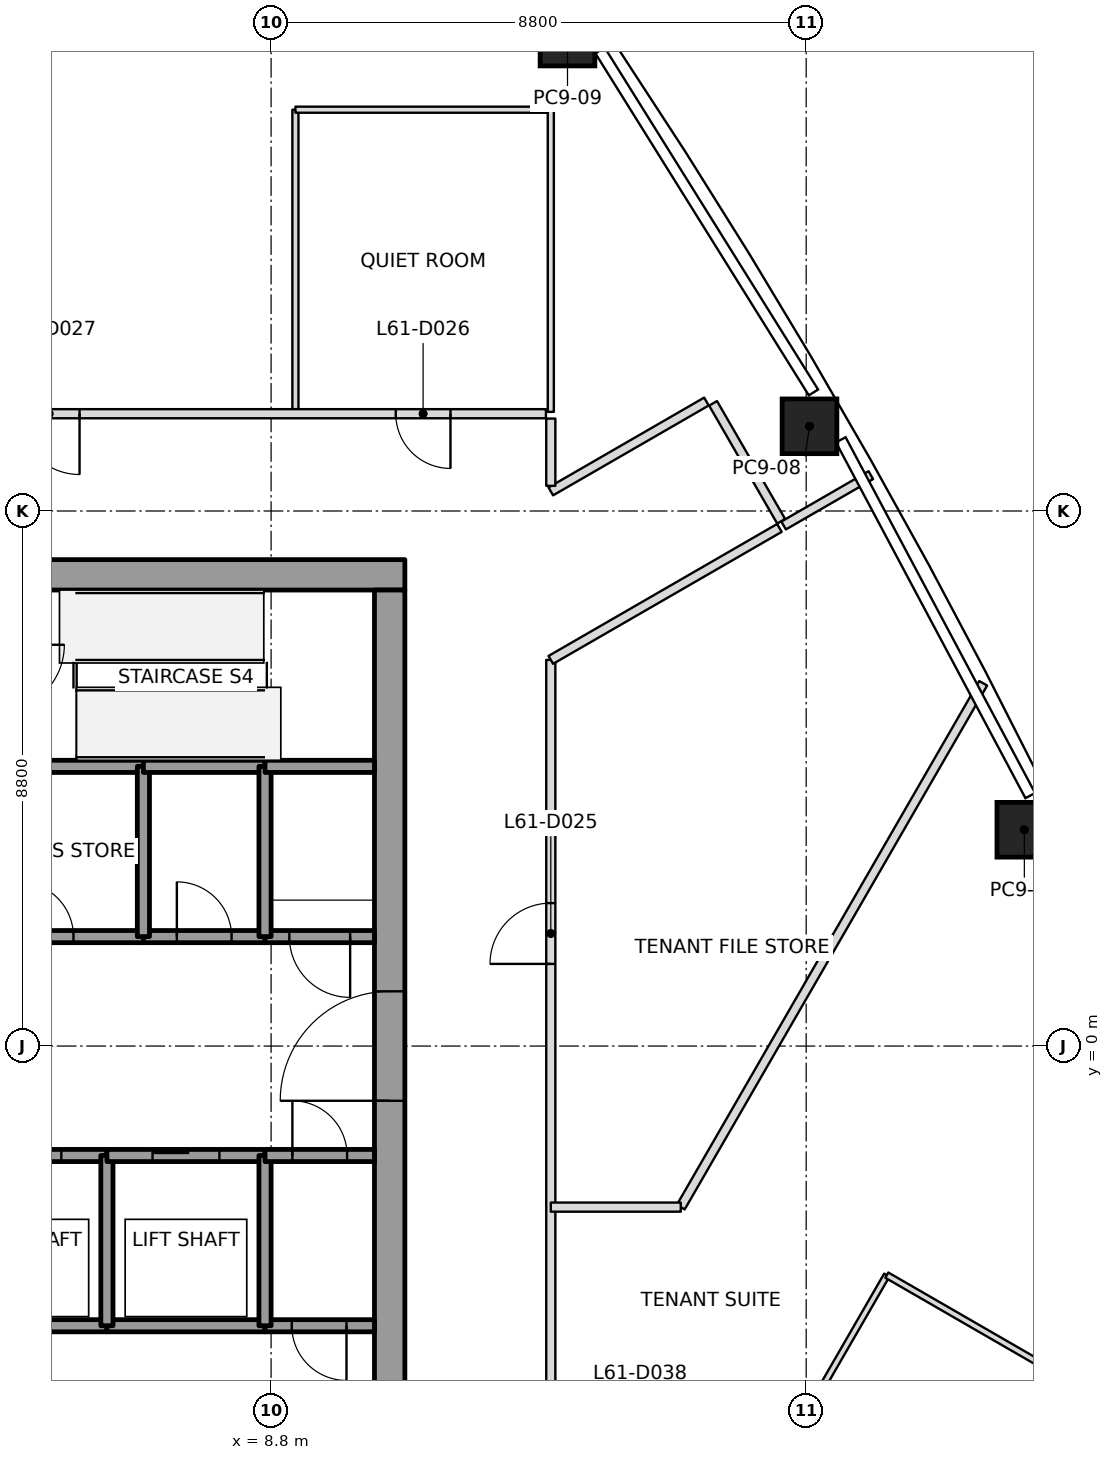
"""IFC4 building model, lengths in metres.
Left out: names, types, materials, properties, quantities, classifications, styles, units other than length and angle.
Written with IfcOpenShell. Run it as: python <this file> out.ifc"""

import sys

from ifc_helpers import new_model, si_unit, direction, frame, frame_2d, origin, origin_2d, place, context, subcontext, project, spatial, rectangle, extrude, element, fill, save


model = new_model("IFC4")
c1 = context("Model", 3, precision=1e-05, world=origin(), true_north=direction((0.0, 1.0)))
c2 = subcontext(c1, "Body", "Model", "MODEL_VIEW")
j1 = project(units=[si_unit("LENGTHUNIT", "METRE"), si_unit("PLANEANGLEUNIT", "RADIAN")], contexts=[c1])
p1 = place(None, origin())
s1 = spatial("IfcSite", under=j1, at=p1, CompositionType="ELEMENT")
p2 = place(p1, origin())
s2 = spatial("IfcBuilding", under=s1, at=p2, CompositionType="ELEMENT")
p3 = place(p2, frame((0.0, 0.0, 271.0)))
s3 = spatial("IfcBuildingStorey", under=s2, at=p3, CompositionType="ELEMENT", Elevation=271.0)
p4 = place(p3, frame((21.188, 3.557, 0.0), z_axis=(-0.014036676147, 0.001952928855, 0.999899573853), x_axis=(-0.439409931321, 0.898251713248, -0.007922872255)))
e1 = element("IfcColumn", 1, at=p4, inside=s3, PredefinedType="COLUMN", context=c2, shape_type="SweptSolid", body=[
    extrude(rectangle(XDim=0.9, YDim=0.9, at=origin_2d()), origin(), (0.0, 0.0, 1.0), 4.0),
])
p5 = place(p3, frame((17.655, 10.193, 0.0), z_axis=(-0.009887049298, -0.00573692984, 0.999934664812), x_axis=(-0.499975560967, 0.866039512843, 2.5126546e-05)))
e2 = element("IfcColumn", 2, at=p5, inside=s3, PredefinedType="COLUMN", context=c2, shape_type="SweptSolid", body=[
    extrude(rectangle(XDim=0.9, YDim=0.9, at=origin_2d()), origin(), (0.0, 0.0, 1.0), 4.0),
])
p6 = place(p3, frame((13.675, 16.571, 0.0), z_axis=(-0.005309522349, -0.013182262383, 0.999899013366), x_axis=(-0.558186239097, 0.829677368481, 0.007974127734)))
e3 = element("IfcColumn", 3, at=p6, inside=s3, PredefinedType="COLUMN", context=c2, shape_type="SweptSolid", body=[
    extrude(rectangle(XDim=0.9, YDim=0.9, at=origin_2d()), origin(), (0.0, 0.0, 1.0), 4.0),
])
p7 = place(p3, frame((-11.0, 7.75, 0.0), z_axis=(0.0, 0.0, 1.0), x_axis=(1.0, 0.0, 0.0)))
e4 = element("IfcWall", 4, at=p7, inside=s3, PredefinedType="SHEAR", context=c2, shape_type="SweptSolid", body=[
    extrude(rectangle(XDim=22.0, YDim=0.5, at=frame_2d((11.0, 0.0))), origin(), (0.0, 0.0, 1.0), 4.0),
])
p8 = place(p7, frame((10.45, 0.0, 0.0)))
e5 = element("IfcOpeningElement", 5, at=p8, cuts=e4, PredefinedType="OPENING", context=c2, shape_type="SweptSolid", body=[
    extrude(rectangle(XDim=1.1, YDim=2.1, at=frame_2d((0.55, 1.05))), frame((0.0, 0.25, 0.0), z_axis=(0.0, -1.0, 0.0), x_axis=(1.0, 0.0, 0.0)), (0.0, 0.0, 1.0), 0.5),
])
p9 = place(p3, frame((10.75, -7.5, 0.0), z_axis=(0.0, 0.0, 1.0), x_axis=(0.0, 1.0, 0.0)))
e6 = element("IfcWall", 6, at=p9, inside=s3, PredefinedType="SHEAR", context=c2, shape_type="SweptSolid", body=[
    extrude(rectangle(XDim=15.0, YDim=0.5, at=frame_2d((7.5, 0.0))), origin(), (0.0, 0.0, 1.0), 4.0),
])
p10 = place(p9, frame((6.6, 0.0, 0.0)))
e7 = element("IfcOpeningElement", 7, at=p10, cuts=e6, PredefinedType="OPENING", context=c2, shape_type="SweptSolid", body=[
    extrude(rectangle(XDim=1.8, YDim=2.1, at=frame_2d((0.9, 1.05))), frame((0.0, 0.25, 0.0), z_axis=(0.0, -1.0, 0.0), x_axis=(1.0, 0.0, 0.0)), (0.0, 0.0, 1.0), 0.5),
])
p11 = place(p3, frame((3.5, -1.8, 0.0), z_axis=(0.0, 0.0, 1.0), x_axis=(1.0, 0.0, 0.0)))
e8 = element("IfcWall", 8, at=p11, inside=s3, PredefinedType="SOLIDWALL", context=c2, shape_type="SweptSolid", body=[
    extrude(rectangle(XDim=2.6, YDim=0.2, at=frame_2d((1.3, 0.0))), origin(), (0.0, 0.0, 1.0), 3.85),
])
p12 = place(p11, frame((0.75, 0.0, 0.0)))
e9 = element("IfcOpeningElement", 9, at=p12, cuts=e8, PredefinedType="OPENING", context=c2, shape_type="SweptSolid", body=[
    extrude(rectangle(XDim=1.1, YDim=2.1, at=frame_2d((0.55, 1.05))), frame((0.0, 0.1, 0.0), z_axis=(0.0, -1.0, 0.0), x_axis=(1.0, 0.0, 0.0)), (0.0, 0.0, 1.0), 0.2),
])
p13 = place(p3, frame((3.5, 1.8, 0.0), z_axis=(0.0, 0.0, 1.0), x_axis=(1.0, 0.0, 0.0)))
e10 = element("IfcWall", 10, at=p13, inside=s3, PredefinedType="SOLIDWALL", context=c2, shape_type="SweptSolid", body=[
    extrude(rectangle(XDim=3.2, YDim=0.2, at=frame_2d((1.6, 0.0))), origin(), (0.0, 0.0, 1.0), 3.85),
])
p14 = place(p13, frame((1.15, 0.0, 0.0)))
e11 = element("IfcOpeningElement", 11, at=p14, cuts=e10, PredefinedType="OPENING", context=c2, shape_type="SweptSolid", body=[
    extrude(rectangle(XDim=0.9, YDim=2.1, at=frame_2d((0.45, 1.05))), frame((0.0, 0.1, 0.0), z_axis=(0.0, -1.0, 0.0), x_axis=(1.0, 0.0, 0.0)), (0.0, 0.0, 1.0), 0.2),
])
p15 = place(p3, frame((6.7, 4.6, 0.0), z_axis=(0.0, 0.0, 1.0), x_axis=(-1.0, 0.0, 0.0)))
e12 = element("IfcWall", 12, at=p15, inside=s3, PredefinedType="SOLIDWALL", context=c2, shape_type="SweptSolid", body=[
    extrude(rectangle(XDim=2.4, YDim=0.2, at=frame_2d((1.2, 0.0))), origin(), (0.0, 0.0, 1.0), 3.85),
])
p16 = place(p3, frame((6.1, -4.6, 0.0), z_axis=(0.0, 0.0, 1.0), x_axis=(-1.0, 0.0, 0.0)))
e13 = element("IfcWall", 13, at=p16, inside=s3, PredefinedType="SOLIDWALL", context=c2, shape_type="SweptSolid", body=[
    extrude(rectangle(XDim=1.6, YDim=0.2, at=frame_2d((0.8, 0.0))), origin(), (0.0, 0.0, 1.0), 3.85),
])
p17 = place(p3, frame((8.7, -4.6, 0.0), z_axis=(0.0, 0.0, 1.0), x_axis=(-1.0, 0.0, 0.0)))
e14 = element("IfcWall", 14, at=p17, inside=s3, PredefinedType="SOLIDWALL", context=c2, shape_type="SweptSolid", body=[
    extrude(rectangle(XDim=2.6, YDim=0.2, at=frame_2d((1.3, 0.0))), origin(), (0.0, 0.0, 1.0), 3.85),
])
p18 = place(p3, frame((6.1, -4.6, 0.0), z_axis=(0.0, 0.0, 1.0), x_axis=(0.0, 1.0, 0.0)))
e15 = element("IfcWall", 15, at=p18, inside=s3, PredefinedType="SOLIDWALL", context=c2, shape_type="SweptSolid", body=[
    extrude(rectangle(XDim=2.8, YDim=0.2, at=frame_2d((1.4, 0.0))), origin(), (0.0, 0.0, 1.0), 3.85),
])
p19 = place(p3, frame((6.1, -1.8, 0.0), z_axis=(0.0, 0.0, 1.0), x_axis=(1.0, 0.0, 0.0)))
e16 = element("IfcWall", 16, at=p19, inside=s3, PredefinedType="SOLIDWALL", context=c2, shape_type="SweptSolid", body=[
    extrude(rectangle(XDim=2.6, YDim=0.2, at=frame_2d((1.3, 0.0))), origin(), (0.0, 0.0, 1.0), 3.85),
])
p20 = place(p19, frame((0.75, 0.0, 0.0)))
e17 = element("IfcOpeningElement", 17, at=p20, cuts=e16, PredefinedType="OPENING", context=c2, shape_type="SweptSolid", body=[
    extrude(rectangle(XDim=1.1, YDim=2.1, at=frame_2d((0.55, 1.05))), frame((0.0, 0.1, 0.0), z_axis=(0.0, -1.0, 0.0), x_axis=(1.0, 0.0, 0.0)), (0.0, 0.0, 1.0), 0.2),
])
p21 = place(p3, frame((6.7, 1.8, 0.0), z_axis=(0.0, 0.0, 1.0), x_axis=(1.0, 0.0, 0.0)))
e18 = element("IfcWall", 18, at=p21, inside=s3, PredefinedType="SOLIDWALL", context=c2, shape_type="SweptSolid", body=[
    extrude(rectangle(XDim=2.0, YDim=0.2, at=frame_2d((1.0, 0.0))), origin(), (0.0, 0.0, 1.0), 3.85),
])
p22 = place(p21, frame((0.55, 0.0, 0.0)))
e19 = element("IfcOpeningElement", 19, at=p22, cuts=e18, PredefinedType="OPENING", context=c2, shape_type="SweptSolid", body=[
    extrude(rectangle(XDim=0.9, YDim=2.1, at=frame_2d((0.45, 1.05))), frame((0.0, 0.1, 0.0), z_axis=(0.0, -1.0, 0.0), x_axis=(1.0, 0.0, 0.0)), (0.0, 0.0, 1.0), 0.2),
])
p23 = place(p3, frame((6.7, 1.8, 0.0), z_axis=(0.0, 0.0, 1.0), x_axis=(0.0, 1.0, 0.0)))
e20 = element("IfcWall", 20, at=p23, inside=s3, PredefinedType="SOLIDWALL", context=c2, shape_type="SweptSolid", body=[
    extrude(rectangle(XDim=2.8, YDim=0.2, at=frame_2d((1.4, 0.0))), origin(), (0.0, 0.0, 1.0), 3.85),
])
p24 = place(p3, frame((8.7, 4.6, 0.0), z_axis=(0.0, 0.0, 1.0), x_axis=(-1.0, 0.0, 0.0)))
e21 = element("IfcWall", 21, at=p24, inside=s3, PredefinedType="SOLIDWALL", context=c2, shape_type="SweptSolid", body=[
    extrude(rectangle(XDim=2.0, YDim=0.2, at=frame_2d((1.0, 0.0))), origin(), (0.0, 0.0, 1.0), 3.85),
])
p25 = place(p3, frame((10.5, -4.6, 0.0), z_axis=(0.0, 0.0, 1.0), x_axis=(-1.0, 0.0, 0.0)))
e22 = element("IfcWall", 22, at=p25, inside=s3, PredefinedType="SOLIDWALL", context=c2, shape_type="SweptSolid", body=[
    extrude(rectangle(XDim=1.8, YDim=0.2, at=frame_2d((0.9, 0.0))), origin(), (0.0, 0.0, 1.0), 3.85),
])
p26 = place(p25, frame((0.46, 0.0, 0.0)))
e23 = element("IfcOpeningElement", 23, at=p26, cuts=e22, PredefinedType="OPENING", context=c2, shape_type="SweptSolid", body=[
    extrude(rectangle(XDim=0.9, YDim=2.1, at=frame_2d((0.45, 1.05))), frame((0.0, 0.1, 0.0), z_axis=(0.0, -1.0, 0.0), x_axis=(1.0, 0.0, 0.0)), (0.0, 0.0, 1.0), 0.2),
])
p27 = place(p3, frame((8.7, -1.8, 0.0), z_axis=(0.0, 0.0, 1.0), x_axis=(0.0, -1.0, 0.0)))
e24 = element("IfcWall", 24, at=p27, inside=s3, PredefinedType="SOLIDWALL", context=c2, shape_type="SweptSolid", body=[
    extrude(rectangle(XDim=2.8, YDim=0.2, at=frame_2d((1.4, 0.0))), origin(), (0.0, 0.0, 1.0), 3.85),
])
p28 = place(p3, frame((8.7, -1.8, 0.0), z_axis=(0.0, 0.0, 1.0), x_axis=(1.0, 0.0, 0.0)))
e25 = element("IfcWall", 25, at=p28, inside=s3, PredefinedType="SOLIDWALL", context=c2, shape_type="SweptSolid", body=[
    extrude(rectangle(XDim=1.8, YDim=0.2, at=frame_2d((0.9, 0.0))), origin(), (0.0, 0.0, 1.0), 3.85),
])
p29 = place(p28, frame((0.45, 0.0, 0.0)))
e26 = element("IfcOpeningElement", 26, at=p29, cuts=e25, PredefinedType="OPENING", context=c2, shape_type="SweptSolid", body=[
    extrude(rectangle(XDim=0.9, YDim=2.1, at=frame_2d((0.45, 1.05))), frame((0.0, 0.1, 0.0), z_axis=(0.0, -1.0, 0.0), x_axis=(1.0, 0.0, 0.0)), (0.0, 0.0, 1.0), 0.2),
])
p30 = place(p3, frame((10.5, 1.8, 0.0), z_axis=(0.0, 0.0, 1.0), x_axis=(-1.0, 0.0, 0.0)))
e27 = element("IfcWall", 27, at=p30, inside=s3, PredefinedType="SOLIDWALL", context=c2, shape_type="SweptSolid", body=[
    extrude(rectangle(XDim=1.8, YDim=0.2, at=frame_2d((0.9, 0.0))), origin(), (0.0, 0.0, 1.0), 3.85),
])
p31 = place(p30, frame((0.4, 0.0, 0.0)))
e28 = element("IfcOpeningElement", 28, at=p31, cuts=e27, PredefinedType="OPENING", context=c2, shape_type="SweptSolid", body=[
    extrude(rectangle(XDim=1.0, YDim=2.1, at=frame_2d((0.5, 1.05))), frame((0.0, 0.1, 0.0), z_axis=(0.0, -1.0, 0.0), x_axis=(1.0, 0.0, 0.0)), (0.0, 0.0, 1.0), 0.2),
])
p32 = place(p3, frame((8.7, 1.8, 0.0), z_axis=(0.0, 0.0, 1.0), x_axis=(0.0, 1.0, 0.0)))
e29 = element("IfcWall", 29, at=p32, inside=s3, PredefinedType="SOLIDWALL", context=c2, shape_type="SweptSolid", body=[
    extrude(rectangle(XDim=2.8, YDim=0.2, at=frame_2d((1.4, 0.0))), origin(), (0.0, 0.0, 1.0), 3.85),
])
p33 = place(p3, frame((10.5, 4.6, 0.0), z_axis=(0.0, 0.0, 1.0), x_axis=(-1.0, 0.0, 0.0)))
e30 = element("IfcWall", 30, at=p33, inside=s3, PredefinedType="SOLIDWALL", context=c2, shape_type="SweptSolid", body=[
    extrude(rectangle(XDim=1.8, YDim=0.2, at=frame_2d((0.9, 0.0))), origin(), (0.0, 0.0, 1.0), 3.85),
])
p34 = place(p3, frame((20.511, 5.966, 0.0), z_axis=(0.0, 0.0, 1.0), x_axis=(-0.500016313644, -0.866015984893, 0.0)))
e31 = element("IfcWall", 31, at=p34, inside=s3, PredefinedType="PARTITIONING", context=c2, shape_type="SweptSolid", body=[
    extrude(rectangle(XDim=9.948, YDim=0.15, at=frame_2d((4.974, 0.0))), origin(), (0.0, 0.0, 1.0), 3.084),
])
p35 = place(p3, frame((15.537, -2.649, 0.0), z_axis=(0.0, 0.0, 1.0), x_axis=(-1.0, 0.0, 0.0)))
e32 = element("IfcWall", 32, at=p35, inside=s3, PredefinedType="PARTITIONING", context=c2, shape_type="SweptSolid", body=[
    extrude(rectangle(XDim=2.137, YDim=0.15, at=frame_2d((1.069, 0.0))), origin(), (0.0, 0.0, 1.0), 3.167),
])
p36 = place(p3, frame((17.229, 8.561, 0.0), z_axis=(0.0, 0.0, 1.0), x_axis=(0.866021116422, 0.500007425856, 0.0)))
e33 = element("IfcWall", 33, at=p36, inside=s3, PredefinedType="PARTITIONING", context=c2, shape_type="SweptSolid", body=[
    extrude(rectangle(XDim=1.656, YDim=0.15, at=frame_2d((0.828, 0.0))), origin(), (0.0, 0.0, 1.0), 3.084),
])
p37 = place(p3, frame((13.32, 10.4, 0.0), z_axis=(0.0, 0.0, 1.0), x_axis=(-1.0, 0.0, 0.0)))
e34 = element("IfcWall", 34, at=p37, inside=s3, PredefinedType="PARTITIONING", context=c2, shape_type="SweptSolid", body=[
    extrude(rectangle(XDim=12.12, YDim=0.15, at=frame_2d((6.06, 0.0))), origin(), (0.0, 0.0, 1.0), 3.293),
])
p38 = place(p37, frame((1.57, 0.0, 0.0)))
e35 = element("IfcOpeningElement", 35, at=p38, cuts=e34, PredefinedType="OPENING", context=c2, shape_type="SweptSolid", body=[
    extrude(rectangle(XDim=0.9, YDim=2.1, at=frame_2d((0.45, 1.05))), frame((0.0, 0.075, 0.0), z_axis=(0.0, -1.0, 0.0), x_axis=(1.0, 0.0, 0.0)), (0.0, 0.0, 1.0), 0.15),
])
p39 = place(p37, frame((7.67, 0.0, 0.0)))
e36 = element("IfcOpeningElement", 36, at=p39, cuts=e34, PredefinedType="OPENING", context=c2, shape_type="SweptSolid", body=[
    extrude(rectangle(XDim=1.0, YDim=2.1, at=frame_2d((0.5, 1.05))), frame((0.0, 0.075, 0.0), z_axis=(0.0, -1.0, 0.0), x_axis=(1.0, 0.0, 0.0)), (0.0, 0.0, 1.0), 0.15),
])
p40 = place(p3, frame((15.959, 10.6, 0.0), z_axis=(0.0, 0.0, 1.0), x_axis=(-0.866023265602, -0.500003703423, 0.0)))
e37 = element("IfcWall", 37, at=p40, inside=s3, PredefinedType="PARTITIONING", context=c2, shape_type="SweptSolid", body=[
    extrude(rectangle(XDim=2.956, YDim=0.15, at=frame_2d((1.478, 0.0))), origin(), (0.0, 0.0, 1.0), 3.3),
])
p41 = place(p3, frame((13.4, 9.214, 0.0), z_axis=(0.0, 0.0, 1.0), x_axis=(0.0, 1.0, 0.0)))
e38 = element("IfcWall", 38, at=p41, inside=s3, PredefinedType="PARTITIONING", context=c2, shape_type="SweptSolid", body=[
    extrude(rectangle(XDim=1.106, YDim=0.15, at=frame_2d((0.553, 0.0))), origin(), (0.0, 0.0, 1.0), 3.3),
])
p42 = place(p3, frame((17.189, 8.631, 0.0), z_axis=(0.0, 0.0, 1.0), x_axis=(-0.49994888933, 0.866054910533, 0.0)))
e39 = element("IfcWall", 39, at=p42, inside=s3, PredefinedType="PARTITIONING", context=c2, shape_type="SweptSolid", body=[
    extrude(rectangle(XDim=2.24, YDim=0.15, at=frame_2d((1.12, 0.0))), origin(), (0.0, 0.0, 1.0), 3.3),
])
p43 = place(p3, frame((13.4, -6.351, 0.0), z_axis=(0.0, 0.0, 1.0), x_axis=(0.0, 1.0, 0.0)))
e40 = element("IfcWall", 40, at=p43, inside=s3, PredefinedType="PARTITIONING", context=c2, shape_type="SweptSolid", body=[
    extrude(rectangle(XDim=12.702, YDim=0.15, at=frame_2d((6.351, 0.0))), origin(), (0.0, 0.0, 1.0), 3.167),
])
p44 = place(p43, frame((7.702, 0.0, 0.0)))
e41 = element("IfcOpeningElement", 41, at=p44, cuts=e40, PredefinedType="OPENING", context=c2, shape_type="SweptSolid", body=[
    extrude(rectangle(XDim=1.0, YDim=2.1, at=frame_2d((0.5, 1.05))), frame((0.0, 0.075, 0.0), z_axis=(0.0, -1.0, 0.0), x_axis=(1.0, 0.0, 0.0)), (0.0, 0.0, 1.0), 0.15),
])
p45 = place(p3, frame((13.4, 6.351, 0.0), z_axis=(0.0, 0.0, 1.0), x_axis=(0.866016071844, 0.500016163047, 0.0)))
e42 = element("IfcWall", 42, at=p45, inside=s3, PredefinedType="PARTITIONING", context=c2, shape_type="SweptSolid", body=[
    extrude(rectangle(XDim=4.341, YDim=0.15, at=frame_2d((2.17, 0.0))), origin(), (0.0, 0.0, 1.0), 3.3),
])
p46 = place(p3, frame((9.2, 10.43, 0.0), z_axis=(0.0, 0.0, 1.0), x_axis=(0.0, 1.0, 0.0)))
e43 = element("IfcWall", 43, at=p46, inside=s3, PredefinedType="PARTITIONING", context=c2, shape_type="SweptSolid", body=[
    extrude(rectangle(XDim=4.97, YDim=0.1, at=frame_2d((2.485, 0.0))), origin(), (0.0, 0.0, 1.0), 3.3),
])
p47 = place(p3, frame((9.2, 15.4, 0.0), z_axis=(0.0, 0.0, 1.0), x_axis=(1.0, 0.0, 0.0)))
e44 = element("IfcWall", 44, at=p47, inside=s3, PredefinedType="PARTITIONING", context=c2, shape_type="SweptSolid", body=[
    extrude(rectangle(XDim=4.2, YDim=0.1, at=frame_2d((2.1, 0.0))), origin(), (0.0, 0.0, 1.0), 3.3),
])
p48 = place(p3, frame((13.4, 15.4, 0.0), z_axis=(0.0, 0.0, 1.0), x_axis=(0.0, -1.0, 0.0)))
e45 = element("IfcWall", 45, at=p48, inside=s3, PredefinedType="PARTITIONING", context=c2, shape_type="SweptSolid", body=[
    extrude(rectangle(XDim=4.97, YDim=0.1, at=frame_2d((2.485, 0.0))), origin(), (0.0, 0.0, 1.0), 3.293),
])
p49 = place(p3, frame((16.441, -8.072, 0.0), z_axis=(0.0, 0.0, 1.0), x_axis=(0.499974753747, 0.866039979225, 0.0)))
e46 = element("IfcWall", 46, at=p49, inside=s3, PredefinedType="PARTITIONING", context=c2, shape_type="SweptSolid", body=[
    extrude(rectangle(XDim=4.97, YDim=0.1, at=frame_2d((2.485, 0.0))), origin(), (0.0, 0.0, 1.0), 3.167),
])
p50 = place(p3, frame((18.926, -3.768, 0.0), z_axis=(0.0, 0.0, 1.0), x_axis=(0.866023935413, -0.500002543286, 0.0)))
e47 = element("IfcWall", 47, at=p50, inside=s3, PredefinedType="PARTITIONING", context=c2, shape_type="SweptSolid", body=[
    extrude(rectangle(XDim=4.2, YDim=0.1, at=frame_2d((2.1, 0.0))), origin(), (0.0, 0.0, 1.0), 3.167),
])
p51 = place(p44, origin())
e48 = element("IfcDoor", 48, at=p51, inside=s3, OperationType="SINGLE_SWING_RIGHT", PredefinedType="DOOR", context=c2, shape_type="SweptSolid", body=[
    extrude(rectangle(XDim=1.0, YDim=2.1, at=frame_2d((0.5, 1.05))), frame((0.0, 0.025, 0.0), z_axis=(0.0, -1.0, 0.0), x_axis=(1.0, 0.0, 0.0)), (0.0, 0.0, 1.0), 0.05),
])
fill(e41, e48)
p52 = place(p38, origin())
e49 = element("IfcDoor", 49, at=p52, inside=s3, OperationType="SINGLE_SWING_RIGHT", PredefinedType="DOOR", context=c2, shape_type="SweptSolid", body=[
    extrude(rectangle(XDim=0.9, YDim=2.1, at=frame_2d((0.45, 1.05))), frame((0.0, 0.025, 0.0), z_axis=(0.0, -1.0, 0.0), x_axis=(1.0, 0.0, 0.0)), (0.0, 0.0, 1.0), 0.05),
])
fill(e35, e49)
p53 = place(p39, origin())
e50 = element("IfcDoor", 50, at=p53, inside=s3, OperationType="SINGLE_SWING_LEFT", PredefinedType="DOOR", context=c2, shape_type="SweptSolid", body=[
    extrude(rectangle(XDim=1.0, YDim=2.1, at=frame_2d((0.5, 1.05))), frame((0.0, 0.025, 0.0), z_axis=(0.0, -1.0, 0.0), x_axis=(1.0, 0.0, 0.0)), (0.0, 0.0, 1.0), 0.05),
])
fill(e36, e50)
p54 = place(p12, origin())
e51 = element("IfcDoor", 51, at=p54, inside=s3, OperationType="SLIDING_TO_LEFT", PredefinedType="DOOR", context=c2, shape_type="SweptSolid", body=[
    extrude(rectangle(XDim=1.1, YDim=2.1, at=frame_2d((0.55, 1.05))), frame((0.0, 0.025, 0.0), z_axis=(0.0, -1.0, 0.0), x_axis=(1.0, 0.0, 0.0)), (0.0, 0.0, 1.0), 0.05),
])
fill(e9, e51)
p55 = place(p20, origin())
e52 = element("IfcDoor", 52, at=p55, inside=s3, OperationType="SLIDING_TO_RIGHT", PredefinedType="DOOR", context=c2, shape_type="SweptSolid", body=[
    extrude(rectangle(XDim=1.1, YDim=2.1, at=frame_2d((0.55, 1.05))), frame((0.0, 0.025, 0.0), z_axis=(0.0, -1.0, 0.0), x_axis=(1.0, 0.0, 0.0)), (0.0, 0.0, 1.0), 0.05),
])
fill(e17, e52)
p56 = place(p31, origin())
e53 = element("IfcDoor", 53, at=p56, inside=s3, OperationType="SINGLE_SWING_LEFT", PredefinedType="DOOR", context=c2, shape_type="SweptSolid", body=[
    extrude(rectangle(XDim=1.0, YDim=2.1, at=frame_2d((0.5, 1.05))), frame((0.0, 0.025, 0.0), z_axis=(0.0, -1.0, 0.0), x_axis=(1.0, 0.0, 0.0)), (0.0, 0.0, 1.0), 0.05),
])
fill(e28, e53)
p57 = place(p14, origin())
e54 = element("IfcDoor", 54, at=p57, inside=s3, OperationType="SINGLE_SWING_LEFT", PredefinedType="DOOR", context=c2, shape_type="SweptSolid", body=[
    extrude(rectangle(XDim=0.9, YDim=2.1, at=frame_2d((0.45, 1.05))), frame((0.0, 0.025, 0.0), z_axis=(0.0, -1.0, 0.0), x_axis=(1.0, 0.0, 0.0)), (0.0, 0.0, 1.0), 0.05),
])
fill(e11, e54)
p58 = place(p22, origin())
e55 = element("IfcDoor", 55, at=p58, inside=s3, OperationType="SINGLE_SWING_RIGHT", PredefinedType="DOOR", context=c2, shape_type="SweptSolid", body=[
    extrude(rectangle(XDim=0.9, YDim=2.1, at=frame_2d((0.45, 1.05))), frame((0.0, 0.025, 0.0), z_axis=(0.0, -1.0, 0.0), x_axis=(1.0, 0.0, 0.0)), (0.0, 0.0, 1.0), 0.05),
])
fill(e19, e55)
p59 = place(p26, origin())
e56 = element("IfcDoor", 56, at=p59, inside=s3, OperationType="SINGLE_SWING_RIGHT", PredefinedType="DOOR", context=c2, shape_type="SweptSolid", body=[
    extrude(rectangle(XDim=0.9, YDim=2.1, at=frame_2d((0.45, 1.05))), frame((0.0, 0.025, 0.0), z_axis=(0.0, -1.0, 0.0), x_axis=(1.0, 0.0, 0.0)), (0.0, 0.0, 1.0), 0.05),
])
fill(e23, e56)
p60 = place(p29, origin())
e57 = element("IfcDoor", 57, at=p60, inside=s3, OperationType="SINGLE_SWING_RIGHT", PredefinedType="DOOR", context=c2, shape_type="SweptSolid", body=[
    extrude(rectangle(XDim=0.9, YDim=2.1, at=frame_2d((0.45, 1.05))), frame((0.0, 0.025, 0.0), z_axis=(0.0, -1.0, 0.0), x_axis=(1.0, 0.0, 0.0)), (0.0, 0.0, 1.0), 0.05),
])
fill(e26, e57)
p61 = place(p10, origin())
e58 = element("IfcDoor", 58, at=p61, inside=s3, OperationType="DOUBLE_DOOR_SINGLE_SWING", PredefinedType="DOOR", context=c2, shape_type="SweptSolid", body=[
    extrude(rectangle(XDim=1.8, YDim=2.1, at=frame_2d((0.9, 1.05))), frame((0.0, 0.025, 0.0), z_axis=(0.0, -1.0, 0.0), x_axis=(1.0, 0.0, 0.0)), (0.0, 0.0, 1.0), 0.05),
])
fill(e7, e58)
save(model, sys.argv[1])
